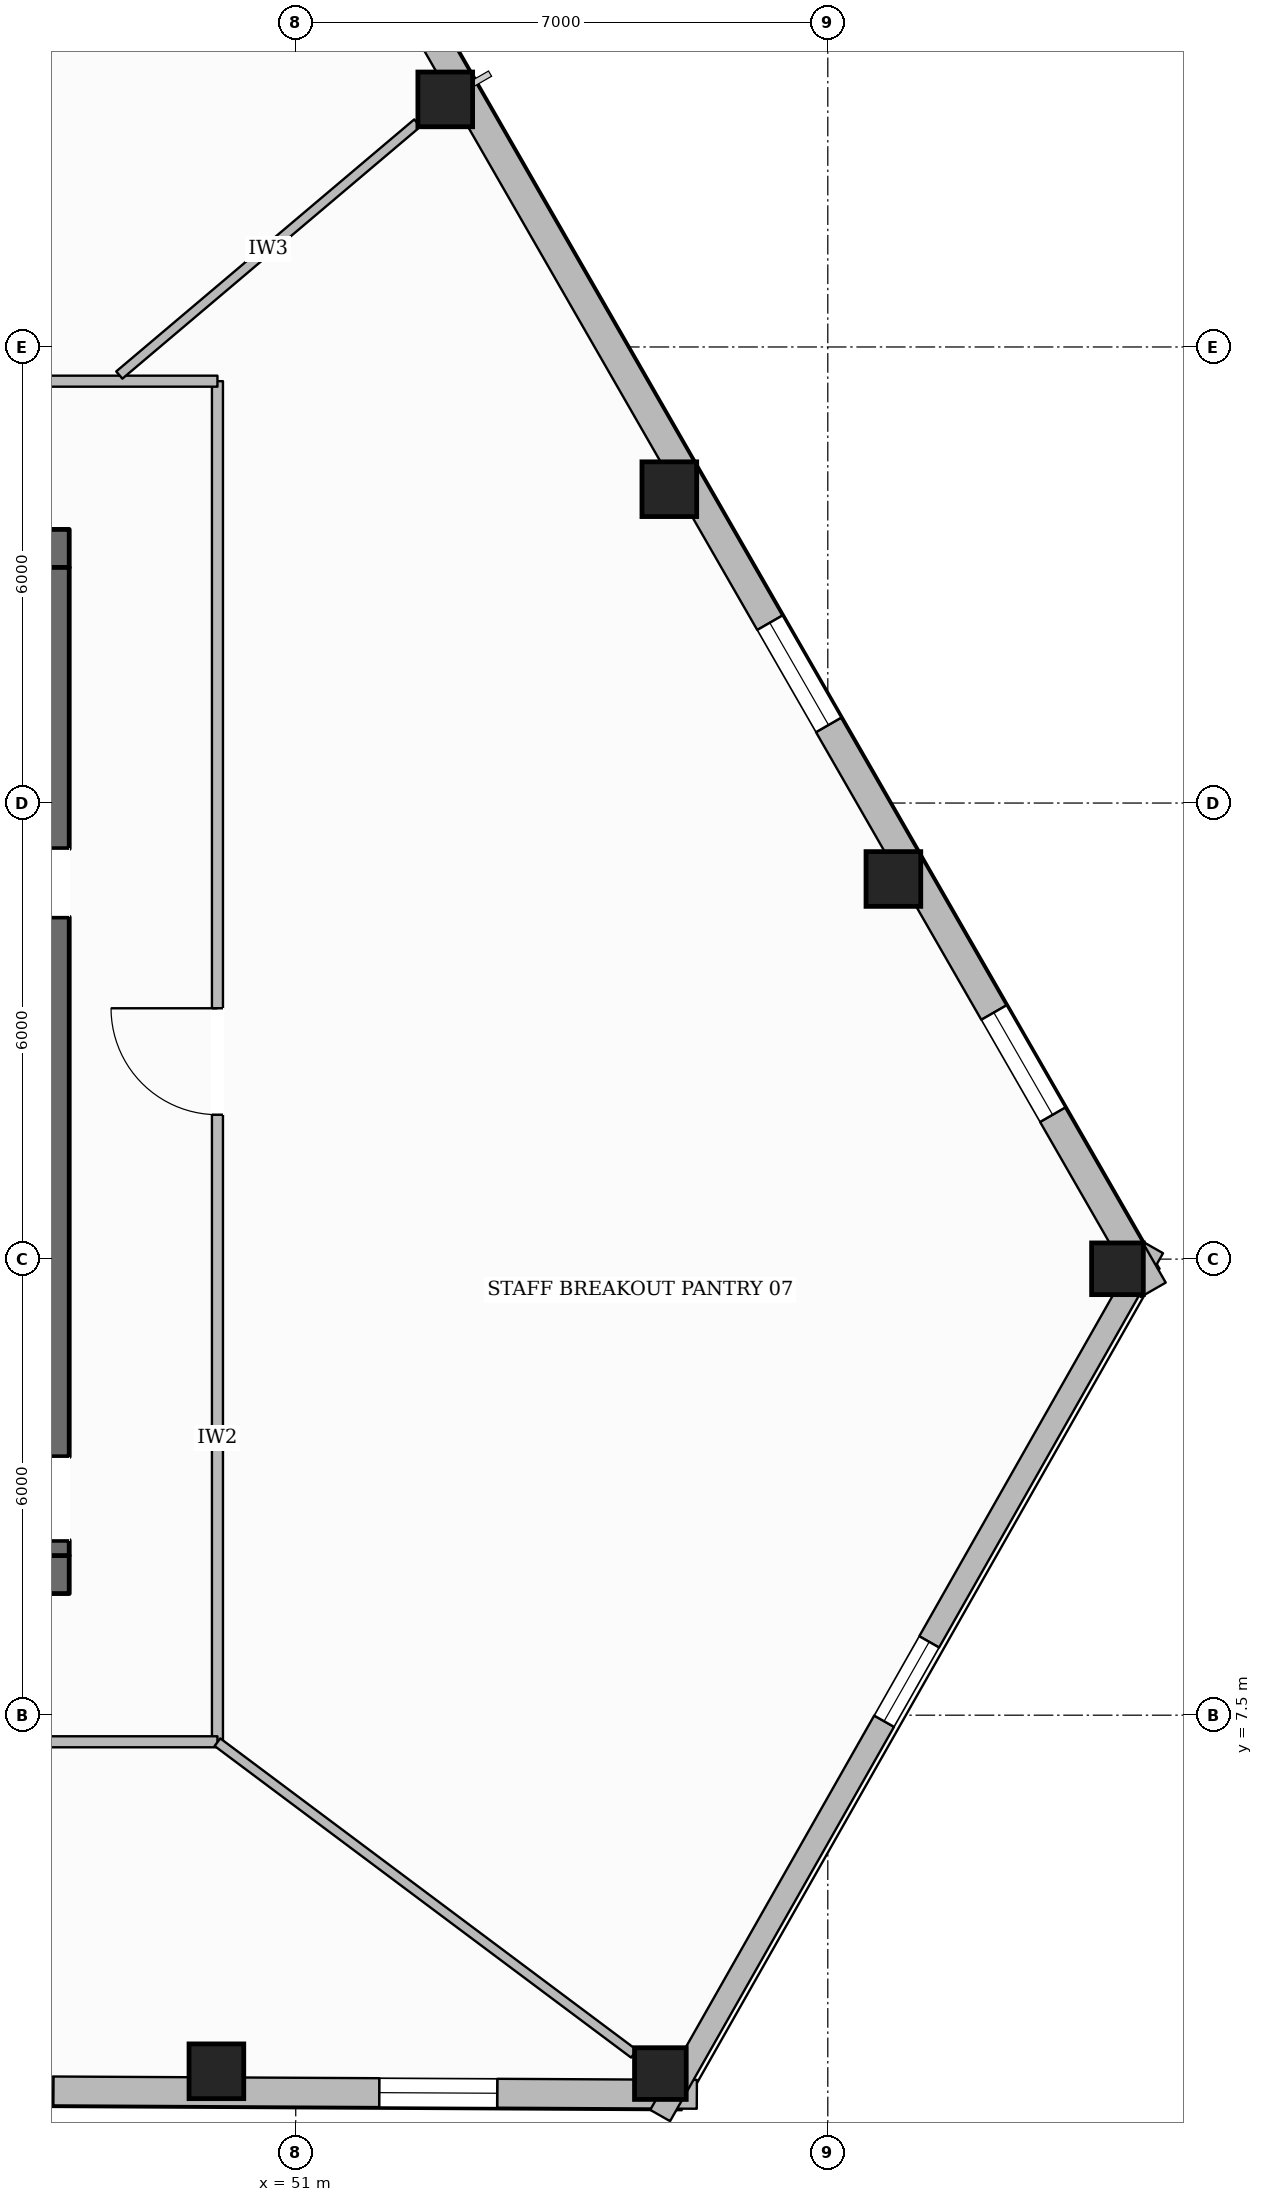
"""IFC4 building model, lengths in metres.
Left out: names, types, materials, properties, quantities, classifications, styles, units other than length and angle.
Written with IfcOpenShell. Run it as: python <this file> out.ifc"""

import sys

from ifc_helpers import new_model, si_unit, direction, frame, frame_2d, origin, origin_2d, place, context, subcontext, project, spatial, rectangle, hollow_rectangle, extrude, element, fill, save


model = new_model("IFC4")
c1 = context("Model", 3, precision=1e-05, world=origin(), true_north=direction((0.0, 1.0)))
c2 = subcontext(c1, "Body", "Model", "MODEL_VIEW")
j1 = project(units=[si_unit("LENGTHUNIT", "METRE"), si_unit("PLANEANGLEUNIT", "RADIAN")], contexts=[c1])
p1 = place(None, origin())
s1 = spatial("IfcSite", under=j1, at=p1, CompositionType="ELEMENT")
p2 = place(p1, origin())
s2 = spatial("IfcBuilding", under=s1, at=p2, CompositionType="ELEMENT")
p3 = place(p2, frame((0.0, 0.0, 104.75)))
s3 = spatial("IfcBuildingStorey", under=s2, at=p3, CompositionType="ELEMENT", Elevation=104.75)
p4 = place(p3, frame((27.98, 9.35, 0.0), z_axis=(0.0, 0.0, 1.0), x_axis=(1.0, 0.0, 0.0)))
e1 = element("IfcWall", 1, at=p4, inside=s3, PredefinedType="SOLIDWALL", context=c2, shape_type="SweptSolid", body=[
    extrude(rectangle(XDim=20.04, YDim=0.5, at=frame_2d((10.02, 0.0))), origin(), (0.0, 0.0, 1.0), 3.6),
])
p5 = place(p4, frame((10.52, 0.0, 0.0)))
e2 = element("IfcOpeningElement", 2, at=p5, cuts=e1, PredefinedType="OPENING", context=c2, shape_type="SweptSolid", body=[
    extrude(rectangle(XDim=1.4, YDim=2.2, at=frame_2d((0.7, 1.1))), frame((0.0, 0.26, 0.0), z_axis=(0.0, -1.0, 0.0), x_axis=(1.0, 0.0, 0.0)), (0.0, 0.0, 1.0), 0.52),
])
p6 = place(p3, frame((27.98, 22.85, 0.0), z_axis=(0.0, 0.0, 1.0), x_axis=(1.0, 0.0, 0.0)))
e3 = element("IfcWall", 3, at=p6, inside=s3, PredefinedType="SOLIDWALL", context=c2, shape_type="SweptSolid", body=[
    extrude(rectangle(XDim=20.04, YDim=0.5, at=frame_2d((10.02, 0.0))), origin(), (0.0, 0.0, 1.0), 3.6),
])
p7 = place(p6, frame((6.295, 0.0, 0.0)))
e4 = element("IfcOpeningElement", 4, at=p7, cuts=e3, PredefinedType="OPENING", context=c2, shape_type="SweptSolid", body=[
    extrude(rectangle(XDim=1.05, YDim=2.15, at=frame_2d((0.525, 1.075))), frame((0.0, 0.26, 0.0), z_axis=(0.0, -1.0, 0.0), x_axis=(1.0, 0.0, 0.0)), (0.0, 0.0, 1.0), 0.52),
])
p8 = place(p6, frame((12.695, 0.0, 0.0)))
e5 = element("IfcOpeningElement", 5, at=p8, cuts=e3, PredefinedType="OPENING", context=c2, shape_type="SweptSolid", body=[
    extrude(rectangle(XDim=1.05, YDim=2.15, at=frame_2d((0.525, 1.075))), frame((0.0, 0.26, 0.0), z_axis=(0.0, -1.0, 0.0), x_axis=(1.0, 0.0, 0.0)), (0.0, 0.0, 1.0), 0.52),
])
p9 = place(p3, frame((47.77, 9.6, 0.0), z_axis=(0.0, 0.0, 1.0), x_axis=(0.0, 1.0, 0.0)))
e6 = element("IfcWall", 6, at=p9, inside=s3, PredefinedType="SOLIDWALL", context=c2, shape_type="SweptSolid", body=[
    extrude(rectangle(XDim=13.0, YDim=0.5, at=frame_2d((6.5, 0.0))), origin(), (0.0, 0.0, 1.0), 3.6),
])
p10 = place(p9, frame((0.2, 0.0, 0.0)))
e7 = element("IfcOpeningElement", 7, at=p10, cuts=e6, PredefinedType="OPENING", context=c2, shape_type="SweptSolid", body=[
    extrude(rectangle(XDim=1.1, YDim=2.15, at=frame_2d((0.55, 1.075))), frame((0.0, 0.26, 0.0), z_axis=(0.0, -1.0, 0.0), x_axis=(1.0, 0.0, 0.0)), (0.0, 0.0, 1.0), 0.52),
])
p11 = place(p9, frame((8.4, 0.0, 0.0)))
e8 = element("IfcOpeningElement", 8, at=p11, cuts=e6, PredefinedType="OPENING", context=c2, shape_type="SweptSolid", body=[
    extrude(rectangle(XDim=0.9, YDim=2.1, at=frame_2d((0.45, 1.05))), frame((0.0, 0.26, 0.0), z_axis=(0.0, -1.0, 0.0), x_axis=(1.0, 0.0, 0.0)), (0.0, 0.0, 1.0), 0.52),
])
p12 = place(p3, frame((49.956, 2.815, 0.0), z_axis=(0.0, 0.0, 1.0), x_axis=(1.0, 0.0, 0.0)))
e9 = element("IfcColumn", 9, at=p12, inside=s3, PredefinedType="COLUMN", context=c2, shape_type="SweptSolid", body=[
    extrude(hollow_rectangle(XDim=0.72, YDim=0.72, WallThickness=0.032, at=origin_2d()), origin(), (0.0, 0.0, 1.0), 3.6),
])
for number, where, z_axis, x_axis in (
    (10, (55.797, 2.785, 0.0), (0.0, 0.0, 1.0), (1.0, 0.0, 0.0)),
    (11, (61.811, 13.373, 0.0), (0.0, 0.0, 1.0), (1.0, 0.0, 0.0)),
):
    element("IfcColumn", number, at=place(p3, frame(where, z_axis=z_axis, x_axis=x_axis)), inside=s3, PredefinedType="COLUMN", context=c2, shape_type="SweptSolid", body=[
        extrude(hollow_rectangle(XDim=0.68, YDim=0.68, WallThickness=0.03, at=origin_2d()), origin(), (0.0, 0.0, 1.0), 3.6),
    ])
for number, where, z_axis, x_axis in (
    (12, (58.863, 18.501, 0.0), (0.0, 0.0, 1.0), (1.0, 0.0, 0.0)),
    (13, (55.915, 23.629, 0.0), (0.0, 0.0, 1.0), (1.0, 0.0, 0.0)),
    (14, (52.967, 28.757, 0.0), (0.0, 0.0, 1.0), (1.0, 0.0, 0.0)),
):
    element("IfcColumn", number, at=place(p3, frame(where, z_axis=z_axis, x_axis=x_axis)), inside=s3, PredefinedType="COLUMN", context=c2, shape_type="SweptSolid", body=[
        extrude(hollow_rectangle(XDim=0.72, YDim=0.72, WallThickness=0.032, at=origin_2d()), origin(), (0.0, 0.0, 1.0), 3.6),
    ])
p13 = place(p3, frame((56.277, 2.512, 0.0), z_axis=(0.0, 0.0, 1.0), x_axis=(-0.999986545033, 0.005187461141, 0.0)))
e15 = element("IfcWall", 15, at=p13, inside=s3, PredefinedType="STANDARD", context=c2, shape_type="SweptSolid", body=[
    extrude(rectangle(XDim=36.004, YDim=0.38, at=frame_2d((18.002, 0.0))), origin(), (0.0, 0.0, 1.0), 3.059),
])
p14 = place(p13, frame((31.832, 0.0, 0.65)))
e16 = element("IfcOpeningElement", 16, at=p14, cuts=e15, PredefinedType="OPENING", context=c2, shape_type="SweptSolid", body=[
    extrude(rectangle(XDim=1.55, YDim=1.75, at=frame_2d((0.775, 0.875))), frame((0.0, 0.2, 0.0), z_axis=(0.0, -1.0, 0.0), x_axis=(1.0, 0.0, 0.0)), (0.0, 0.0, 1.0), 0.4),
])
p15 = place(p13, frame((25.991, 0.0, 0.65)))
e17 = element("IfcOpeningElement", 17, at=p15, cuts=e15, PredefinedType="OPENING", context=c2, shape_type="SweptSolid", body=[
    extrude(rectangle(XDim=1.55, YDim=1.75, at=frame_2d((0.775, 0.875))), frame((0.0, 0.2, 0.0), z_axis=(0.0, -1.0, 0.0), x_axis=(1.0, 0.0, 0.0)), (0.0, 0.0, 1.0), 0.4),
])
p16 = place(p13, frame((14.309, 0.0, 0.65)))
e18 = element("IfcOpeningElement", 18, at=p16, cuts=e15, PredefinedType="OPENING", context=c2, shape_type="SweptSolid", body=[
    extrude(rectangle(XDim=1.55, YDim=1.75, at=frame_2d((0.775, 0.875))), frame((0.0, 0.2, 0.0), z_axis=(0.0, -1.0, 0.0), x_axis=(1.0, 0.0, 0.0)), (0.0, 0.0, 1.0), 0.4),
])
p17 = place(p13, frame((8.468, 0.0, 0.65)))
e19 = element("IfcOpeningElement", 19, at=p17, cuts=e15, PredefinedType="OPENING", context=c2, shape_type="SweptSolid", body=[
    extrude(rectangle(XDim=1.55, YDim=1.75, at=frame_2d((0.775, 0.875))), frame((0.0, 0.2, 0.0), z_axis=(0.0, -1.0, 0.0), x_axis=(1.0, 0.0, 0.0)), (0.0, 0.0, 1.0), 0.4),
])
p18 = place(p13, frame((2.627, 0.0, 0.65)))
e20 = element("IfcOpeningElement", 20, at=p18, cuts=e15, PredefinedType="OPENING", context=c2, shape_type="SweptSolid", body=[
    extrude(rectangle(XDim=1.55, YDim=1.75, at=frame_2d((0.775, 0.875))), frame((0.0, 0.2, 0.0), z_axis=(0.0, -1.0, 0.0), x_axis=(1.0, 0.0, 0.0)), (0.0, 0.0, 1.0), 0.4),
])
p19 = place(p3, frame((62.28, 13.652, 0.0), z_axis=(0.0, 0.0, 1.0), x_axis=(-0.493862788891, -0.869539847131, 0.0)))
e21 = element("IfcWall", 21, at=p19, inside=s3, PredefinedType="STANDARD", context=c2, shape_type="SweptSolid", body=[
    extrude(rectangle(XDim=13.132, YDim=0.3, at=frame_2d((6.566, 0.0))), origin(), (0.0, 0.0, 1.0), 3.059),
])
p20 = place(p19, frame((5.966, 0.0, 0.65)))
e22 = element("IfcOpeningElement", 22, at=p20, cuts=e21, PredefinedType="OPENING", context=c2, shape_type="SweptSolid", body=[
    extrude(rectangle(XDim=1.2, YDim=1.7, at=frame_2d((0.6, 0.85))), frame((0.0, 0.16, 0.0), z_axis=(0.0, -1.0, 0.0), x_axis=(1.0, 0.0, 0.0)), (0.0, 0.0, 1.0), 0.32),
])
p21 = place(p3, frame((44.12, 44.689, 0.0), z_axis=(0.0, 0.0, 1.0), x_axis=(0.498376840975, -0.866960509124, 0.0)))
e23 = element("IfcWall", 23, at=p21, inside=s3, PredefinedType="STANDARD", context=c2, shape_type="SweptSolid", body=[
    extrude(rectangle(XDim=36.441, YDim=0.38, at=frame_2d((18.22, 0.0))), origin(), (0.0, 0.0, 1.0), 3.059),
])
p22 = place(p21, frame((32.234, 0.0, 0.65)))
e24 = element("IfcOpeningElement", 24, at=p22, cuts=e23, PredefinedType="OPENING", context=c2, shape_type="SweptSolid", body=[
    extrude(rectangle(XDim=1.55, YDim=1.75, at=frame_2d((0.775, 0.875))), frame((0.0, 0.2, 0.0), z_axis=(0.0, -1.0, 0.0), x_axis=(1.0, 0.0, 0.0)), (0.0, 0.0, 1.0), 0.4),
])
p23 = place(p21, frame((26.319, 0.0, 0.65)))
e25 = element("IfcOpeningElement", 25, at=p23, cuts=e23, PredefinedType="OPENING", context=c2, shape_type="SweptSolid", body=[
    extrude(rectangle(XDim=1.55, YDim=1.75, at=frame_2d((0.775, 0.875))), frame((0.0, 0.2, 0.0), z_axis=(0.0, -1.0, 0.0), x_axis=(1.0, 0.0, 0.0)), (0.0, 0.0, 1.0), 0.4),
])
p24 = place(p21, frame((14.489, 0.0, 0.65)))
e26 = element("IfcOpeningElement", 26, at=p24, cuts=e23, PredefinedType="OPENING", context=c2, shape_type="SweptSolid", body=[
    extrude(rectangle(XDim=1.55, YDim=1.75, at=frame_2d((0.775, 0.875))), frame((0.0, 0.2, 0.0), z_axis=(0.0, -1.0, 0.0), x_axis=(1.0, 0.0, 0.0)), (0.0, 0.0, 1.0), 0.4),
])
p25 = place(p21, frame((8.573, 0.0, 0.65)))
e27 = element("IfcOpeningElement", 27, at=p25, cuts=e23, PredefinedType="OPENING", context=c2, shape_type="SweptSolid", body=[
    extrude(rectangle(XDim=1.55, YDim=1.75, at=frame_2d((0.775, 0.875))), frame((0.0, 0.2, 0.0), z_axis=(0.0, -1.0, 0.0), x_axis=(1.0, 0.0, 0.0)), (0.0, 0.0, 1.0), 0.4),
])
p26 = place(p21, frame((2.658, 0.0, 0.65)))
e28 = element("IfcOpeningElement", 28, at=p26, cuts=e23, PredefinedType="OPENING", context=c2, shape_type="SweptSolid", body=[
    extrude(rectangle(XDim=1.55, YDim=1.75, at=frame_2d((0.775, 0.875))), frame((0.0, 0.2, 0.0), z_axis=(0.0, -1.0, 0.0), x_axis=(1.0, 0.0, 0.0)), (0.0, 0.0, 1.0), 0.4),
])
p27 = place(p3, frame((49.97, 7.15, 0.0), z_axis=(0.0, 0.0, 1.0), x_axis=(0.0, 1.0, 0.0)))
e29 = element("IfcWall", 29, at=p27, inside=s3, PredefinedType="PARTITIONING", context=c2, shape_type="SweptSolid", body=[
    extrude(rectangle(XDim=17.9, YDim=0.145, at=frame_2d((8.95, 0.0))), origin(), (0.0, 0.0, 1.0), 3.288),
])
p28 = place(p27, frame((8.25, 0.0, 0.0)))
e30 = element("IfcOpeningElement", 30, at=p28, cuts=e29, PredefinedType="OPENING", context=c2, shape_type="SweptSolid", body=[
    extrude(rectangle(XDim=1.4, YDim=2.2, at=frame_2d((0.7, 1.1))), frame((0.0, 0.083, 0.0), z_axis=(0.0, -1.0, 0.0), x_axis=(1.0, 0.0, 0.0)), (0.0, 0.0, 1.0), 0.165),
])
p29 = place(p3, frame((49.97, 25.05, 0.0), z_axis=(0.0, 0.0, 1.0), x_axis=(-1.0, 0.0, 0.0)))
e31 = element("IfcWall", 31, at=p29, inside=s3, PredefinedType="PARTITIONING", context=c2, shape_type="SweptSolid", body=[
    extrude(rectangle(XDim=23.94, YDim=0.145, at=frame_2d((11.97, 0.0))), origin(), (0.0, 0.0, 1.0), 3.6),
])
p30 = place(p29, frame((5.824, 0.0, 0.0)))
e32 = element("IfcOpeningElement", 32, at=p30, cuts=e31, PredefinedType="OPENING", context=c2, shape_type="SweptSolid", body=[
    extrude(rectangle(XDim=1.4, YDim=2.2, at=frame_2d((0.7, 1.1))), frame((0.0, 0.083, 0.0), z_axis=(0.0, -1.0, 0.0), x_axis=(1.0, 0.0, 0.0)), (0.0, 0.0, 1.0), 0.165),
])
p31 = place(p29, frame((16.238, 0.0, 0.0)))
e33 = element("IfcOpeningElement", 33, at=p31, cuts=e31, PredefinedType="OPENING", context=c2, shape_type="SweptSolid", body=[
    extrude(rectangle(XDim=1.4, YDim=2.2, at=frame_2d((0.7, 1.1))), frame((0.0, 0.083, 0.0), z_axis=(0.0, -1.0, 0.0), x_axis=(1.0, 0.0, 0.0)), (0.0, 0.0, 1.0), 0.165),
])
p32 = place(p3, frame((26.03, 7.15, 0.0), z_axis=(0.0, 0.0, 1.0), x_axis=(1.0, 0.0, 0.0)))
e34 = element("IfcWall", 34, at=p32, inside=s3, PredefinedType="PARTITIONING", context=c2, shape_type="SweptSolid", body=[
    extrude(rectangle(XDim=23.94, YDim=0.145, at=frame_2d((11.97, 0.0))), origin(), (0.0, 0.0, 1.0), 3.6),
])
p33 = place(p32, frame((4.53, 0.0, 0.0)))
e35 = element("IfcOpeningElement", 35, at=p33, cuts=e34, PredefinedType="OPENING", context=c2, shape_type="SweptSolid", body=[
    extrude(rectangle(XDim=0.88, YDim=2.1, at=frame_2d((0.44, 1.05))), frame((0.0, 0.083, 0.0), z_axis=(0.0, -1.0, 0.0), x_axis=(1.0, 0.0, 0.0)), (0.0, 0.0, 1.0), 0.165),
])
p34 = place(p32, frame((7.05, 0.0, 0.0)))
e36 = element("IfcOpeningElement", 36, at=p34, cuts=e34, PredefinedType="OPENING", context=c2, shape_type="SweptSolid", body=[
    extrude(rectangle(XDim=0.88, YDim=2.1, at=frame_2d((0.44, 1.05))), frame((0.0, 0.083, 0.0), z_axis=(0.0, -1.0, 0.0), x_axis=(1.0, 0.0, 0.0)), (0.0, 0.0, 1.0), 0.165),
])
p35 = place(p32, frame((9.43, 0.0, 0.0)))
e37 = element("IfcOpeningElement", 37, at=p35, cuts=e34, PredefinedType="OPENING", context=c2, shape_type="SweptSolid", body=[
    extrude(rectangle(XDim=0.96, YDim=2.1, at=frame_2d((0.48, 1.05))), frame((0.0, 0.083, 0.0), z_axis=(0.0, -1.0, 0.0), x_axis=(1.0, 0.0, 0.0)), (0.0, 0.0, 1.0), 0.165),
])
p36 = place(p32, frame((1.456, 0.0, 0.0)))
e38 = element("IfcOpeningElement", 38, at=p36, cuts=e34, PredefinedType="OPENING", context=c2, shape_type="SweptSolid", body=[
    extrude(rectangle(XDim=0.98, YDim=2.15, at=frame_2d((0.49, 1.075))), frame((0.0, 0.083, 0.0), z_axis=(0.0, -1.0, 0.0), x_axis=(1.0, 0.0, 0.0)), (0.0, 0.0, 1.0), 0.165),
])
p37 = place(p32, frame((16.714, 0.0, 0.0)))
e39 = element("IfcOpeningElement", 39, at=p37, cuts=e34, PredefinedType="OPENING", context=c2, shape_type="SweptSolid", body=[
    extrude(rectangle(XDim=1.4, YDim=2.2, at=frame_2d((0.7, 1.1))), frame((0.0, 0.083, 0.0), z_axis=(0.0, -1.0, 0.0), x_axis=(1.0, 0.0, 0.0)), (0.0, 0.0, 1.0), 0.165),
])
p38 = place(p3, frame((48.679, 25.131, 0.0), z_axis=(0.0, 0.0, 1.0), x_axis=(0.763563012799, 0.645733323815, 0.0)))
e40 = element("IfcWall", 40, at=p38, inside=s3, PredefinedType="PARTITIONING", context=c2, shape_type="SweptSolid", body=[
    extrude(rectangle(XDim=5.134, YDim=0.125, at=frame_2d((2.567, 0.0))), origin(), (0.0, 0.0, 1.0), 3.141),
])
p39 = place(p3, frame((49.97, 7.145, 0.0), z_axis=(0.0, 0.0, 1.0), x_axis=(0.800705856265, -0.599057703183, 0.0)))
e41 = element("IfcWall", 41, at=p39, inside=s3, PredefinedType="PARTITIONING", context=c2, shape_type="SweptSolid", body=[
    extrude(rectangle(XDim=6.843, YDim=0.125, at=frame_2d((3.421, 0.0))), origin(), (0.0, 0.0, 1.0), 3.141),
])
p40 = place(p17, origin())
e42 = element("IfcWindow", 42, at=p40, inside=s3, PartitioningType="SINGLE_PANEL", PredefinedType="WINDOW", context=c2, shape_type="SweptSolid", body=[
    extrude(rectangle(XDim=1.55, YDim=1.75, at=frame_2d((0.775, 0.875))), frame((0.0, 0.03, 0.0), z_axis=(0.0, -1.0, 0.0), x_axis=(1.0, 0.0, 0.0)), (0.0, 0.0, 1.0), 0.06),
])
fill(e19, e42)
p41 = place(p18, origin())
e43 = element("IfcWindow", 43, at=p41, inside=s3, PartitioningType="SINGLE_PANEL", PredefinedType="WINDOW", context=c2, shape_type="SweptSolid", body=[
    extrude(rectangle(XDim=1.55, YDim=1.75, at=frame_2d((0.775, 0.875))), frame((0.0, 0.03, 0.0), z_axis=(0.0, -1.0, 0.0), x_axis=(1.0, 0.0, 0.0)), (0.0, 0.0, 1.0), 0.06),
])
fill(e20, e43)
p42 = place(p22, origin())
e44 = element("IfcWindow", 44, at=p42, inside=s3, PartitioningType="SINGLE_PANEL", PredefinedType="WINDOW", context=c2, shape_type="SweptSolid", body=[
    extrude(rectangle(XDim=1.55, YDim=1.75, at=frame_2d((0.775, 0.875))), frame((0.0, 0.03, 0.0), z_axis=(0.0, -1.0, 0.0), x_axis=(1.0, 0.0, 0.0)), (0.0, 0.0, 1.0), 0.06),
])
fill(e24, e44)
p43 = place(p23, origin())
e45 = element("IfcWindow", 45, at=p43, inside=s3, PartitioningType="SINGLE_PANEL", PredefinedType="WINDOW", context=c2, shape_type="SweptSolid", body=[
    extrude(rectangle(XDim=1.55, YDim=1.75, at=frame_2d((0.775, 0.875))), frame((0.0, 0.03, 0.0), z_axis=(0.0, -1.0, 0.0), x_axis=(1.0, 0.0, 0.0)), (0.0, 0.0, 1.0), 0.06),
])
fill(e25, e45)
p44 = place(p20, origin())
e46 = element("IfcWindow", 46, at=p44, inside=s3, PartitioningType="SINGLE_PANEL", PredefinedType="WINDOW", context=c2, shape_type="SweptSolid", body=[
    extrude(rectangle(XDim=1.2, YDim=1.7, at=frame_2d((0.6, 0.85))), frame((0.0, 0.03, 0.0), z_axis=(0.0, -1.0, 0.0), x_axis=(1.0, 0.0, 0.0)), (0.0, 0.0, 1.0), 0.06),
])
fill(e22, e46)
p45 = place(p28, origin())
e47 = element("IfcDoor", 47, at=p45, inside=s3, OperationType="SINGLE_SWING_RIGHT", PredefinedType="DOOR", context=c2, shape_type="SweptSolid", body=[
    extrude(rectangle(XDim=1.4, YDim=2.2, at=frame_2d((0.7, 1.1))), frame((0.0, 0.025, 0.0), z_axis=(0.0, -1.0, 0.0), x_axis=(1.0, 0.0, 0.0)), (0.0, 0.0, 1.0), 0.05),
])
fill(e30, e47)
save(model, sys.argv[1])
